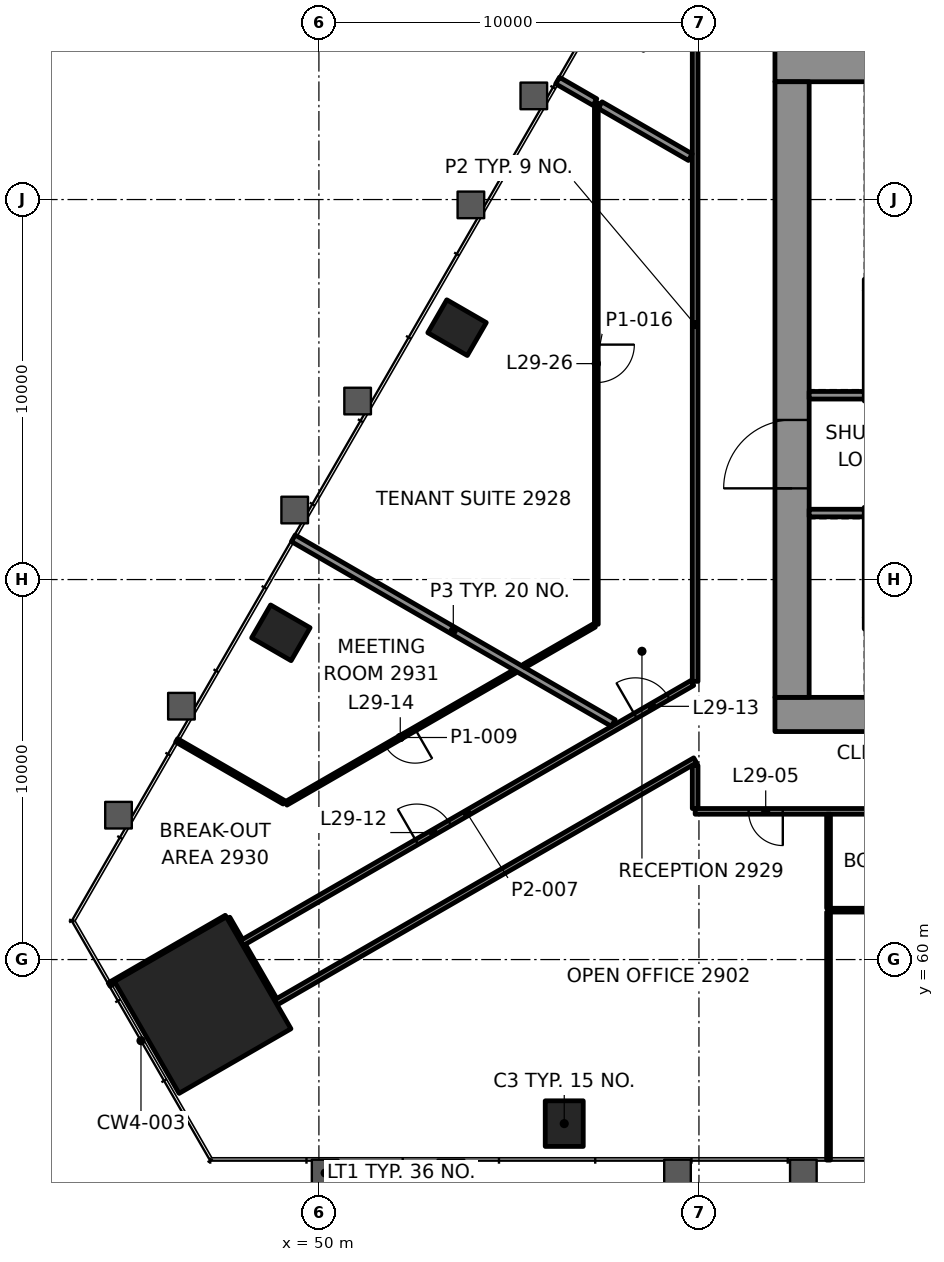
"""IFC4 building model, lengths in metres.
Left out: names, types, materials, properties, quantities, classifications, styles, units other than length and angle.
Written with IfcOpenShell. Run it as: python <this file> out.ifc"""

import sys

from ifc_helpers import new_model, si_unit, direction, frame, frame_2d, origin, origin_2d, place, context, subcontext, project, spatial, rectangle, extrude, element, fill, save


model = new_model("IFC4")
c1 = context("Model", 3, precision=1e-05, world=origin(), true_north=direction((0.0, 1.0)))
c2 = subcontext(c1, "Body", "Model", "MODEL_VIEW")
j1 = project(units=[si_unit("LENGTHUNIT", "METRE"), si_unit("PLANEANGLEUNIT", "RADIAN")], contexts=[c1])
p1 = place(None, origin())
s1 = spatial("IfcSite", under=j1, at=p1, CompositionType="ELEMENT")
p2 = place(p1, origin())
s2 = spatial("IfcBuilding", under=s1, at=p2, CompositionType="ELEMENT")
p3 = place(p2, frame((0.0, 0.0, 128.2)))
s3 = spatial("IfcBuildingStorey", under=s2, at=p3, CompositionType="ELEMENT", Elevation=128.2)
p4 = place(p3, frame((46.942, 58.801, 0.0), z_axis=(0.0, 0.0, 1.0), x_axis=(0.5, -0.866025403784, 0.0)))
e1 = element("IfcColumn", 1, at=p4, inside=s3, PredefinedType="COLUMN", context=c2, shape_type="SweptSolid", body=[
    extrude(rectangle(XDim=3.4, YDim=3.4, at=origin_2d()), origin(), (0.0, 0.0, 1.0), 4.2),
])
for number, where, z_axis, x_axis in (
    (2, (56.455, 55.683, -0.0), (0.0, 0.0, 1.0), (1.0, 0.0, 0.0)),
    (3, (53.635, 76.628, -0.0), (0.0, 0.0, 1.0), (-0.5, -0.866, 0.0)),
    (4, (48.999, 68.598, -0.0), (0.0, 0.0, 1.0), (-0.5, -0.866, 0.0)),
):
    element("IfcColumn", number, at=place(p3, frame(where, z_axis=z_axis, x_axis=x_axis)), inside=s3, PredefinedType="COLUMN", context=c2, shape_type="SweptSolid", body=[
        extrude(rectangle(XDim=1.0, YDim=1.2, at=origin_2d()), origin(), (0.0, 0.0, 1.0), 4.2),
    ])
p5 = place(p3, frame((62.0, 66.45, 0.0), z_axis=(0.0, 0.0, 1.0), x_axis=(1.0, 0.0, 0.0)))
e5 = element("IfcWall", 5, at=p5, inside=s3, PredefinedType="SHEAR", context=c2, shape_type="SweptSolid", body=[
    extrude(rectangle(XDim=26.0, YDim=0.9, at=frame_2d((13.0, 0.0))), origin(), (0.0, 0.0, 1.0), 4.0),
])
p6 = place(p5, frame((3.45, 0.0, 0.0)))
e6 = element("IfcOpeningElement", 6, at=p6, cuts=e5, PredefinedType="OPENING", context=c2, shape_type="SweptSolid", body=[
    extrude(rectangle(XDim=0.9, YDim=2.1, at=frame_2d((0.45, 1.05))), frame((0.0, 0.46, 0.0), z_axis=(0.0, -1.0, 0.0), x_axis=(1.0, 0.0, 0.0)), (0.0, 0.0, 1.0), 0.92),
])
p7 = place(p5, frame((6.425, 0.0, 0.0)))
e7 = element("IfcOpeningElement", 7, at=p7, cuts=e5, PredefinedType="OPENING", context=c2, shape_type="SweptSolid", body=[
    extrude(rectangle(XDim=0.9, YDim=2.1, at=frame_2d((0.45, 1.05))), frame((0.0, 0.46, 0.0), z_axis=(0.0, -1.0, 0.0), x_axis=(1.0, 0.0, 0.0)), (0.0, 0.0, 1.0), 0.92),
])
p8 = place(p5, frame((9.4, 0.0, 0.0)))
e8 = element("IfcOpeningElement", 8, at=p8, cuts=e5, PredefinedType="OPENING", context=c2, shape_type="SweptSolid", body=[
    extrude(rectangle(XDim=0.9, YDim=2.1, at=frame_2d((0.45, 1.05))), frame((0.0, 0.46, 0.0), z_axis=(0.0, -1.0, 0.0), x_axis=(1.0, 0.0, 0.0)), (0.0, 0.0, 1.0), 0.92),
])
p9 = place(p5, frame((14.262, 0.0, 0.0)))
e9 = element("IfcOpeningElement", 9, at=p9, cuts=e5, PredefinedType="OPENING", context=c2, shape_type="SweptSolid", body=[
    extrude(rectangle(XDim=0.9, YDim=2.1, at=frame_2d((0.45, 1.05))), frame((0.0, 0.46, 0.0), z_axis=(0.0, -1.0, 0.0), x_axis=(1.0, 0.0, 0.0)), (0.0, 0.0, 1.0), 0.92),
])
p10 = place(p5, frame((21.188, 0.0, 0.0)))
e10 = element("IfcOpeningElement", 10, at=p10, cuts=e5, PredefinedType="OPENING", context=c2, shape_type="SweptSolid", body=[
    extrude(rectangle(XDim=0.9, YDim=2.1, at=frame_2d((0.45, 1.05))), frame((0.0, 0.46, 0.0), z_axis=(0.0, -1.0, 0.0), x_axis=(1.0, 0.0, 0.0)), (0.0, 0.0, 1.0), 0.92),
])
p11 = place(p3, frame((62.0, 83.55, 0.0), z_axis=(0.0, 0.0, 1.0), x_axis=(1.0, 0.0, 0.0)))
e11 = element("IfcWall", 11, at=p11, inside=s3, PredefinedType="SHEAR", context=c2, shape_type="SweptSolid", body=[
    extrude(rectangle(XDim=26.0, YDim=0.9, at=frame_2d((13.0, 0.0))), origin(), (0.0, 0.0, 1.0), 4.0),
])
p12 = place(p11, frame((5.695, 0.0, 0.0)))
e12 = element("IfcOpeningElement", 12, at=p12, cuts=e11, PredefinedType="OPENING", context=c2, shape_type="SweptSolid", body=[
    extrude(rectangle(XDim=1.0, YDim=2.1, at=frame_2d((0.5, 1.05))), frame((0.0, 0.46, 0.0), z_axis=(0.0, -1.0, 0.0), x_axis=(1.0, 0.0, 0.0)), (0.0, 0.0, 1.0), 0.92),
])
p13 = place(p11, frame((19.505, 0.0, 0.0)))
e13 = element("IfcOpeningElement", 13, at=p13, cuts=e11, PredefinedType="OPENING", context=c2, shape_type="SweptSolid", body=[
    extrude(rectangle(XDim=1.0, YDim=2.1, at=frame_2d((0.5, 1.05))), frame((0.0, 0.46, 0.0), z_axis=(0.0, -1.0, 0.0), x_axis=(1.0, 0.0, 0.0)), (0.0, 0.0, 1.0), 0.92),
])
p14 = place(p11, frame((3.45, 0.0, 0.0)))
e14 = element("IfcOpeningElement", 14, at=p14, cuts=e11, PredefinedType="OPENING", context=c2, shape_type="SweptSolid", body=[
    extrude(rectangle(XDim=0.9, YDim=2.1, at=frame_2d((0.45, 1.05))), frame((0.0, 0.46, 0.0), z_axis=(0.0, -1.0, 0.0), x_axis=(1.0, 0.0, 0.0)), (0.0, 0.0, 1.0), 0.92),
])
p15 = place(p11, frame((12.65, 0.0, 0.0)))
e15 = element("IfcOpeningElement", 15, at=p15, cuts=e11, PredefinedType="OPENING", context=c2, shape_type="SweptSolid", body=[
    extrude(rectangle(XDim=0.9, YDim=2.1, at=frame_2d((0.45, 1.05))), frame((0.0, 0.46, 0.0), z_axis=(0.0, -1.0, 0.0), x_axis=(1.0, 0.0, 0.0)), (0.0, 0.0, 1.0), 0.92),
])
p16 = place(p11, frame((22.55, 0.0, 0.0)))
e16 = element("IfcOpeningElement", 16, at=p16, cuts=e11, PredefinedType="OPENING", context=c2, shape_type="SweptSolid", body=[
    extrude(rectangle(XDim=0.9, YDim=2.1, at=frame_2d((0.45, 1.05))), frame((0.0, 0.46, 0.0), z_axis=(0.0, -1.0, 0.0), x_axis=(1.0, 0.0, 0.0)), (0.0, 0.0, 1.0), 0.92),
])
p17 = place(p3, frame((62.45, 66.9, 0.0), z_axis=(0.0, 0.0, 1.0), x_axis=(0.0, 1.0, 0.0)))
e17 = element("IfcWall", 17, at=p17, inside=s3, PredefinedType="SHEAR", context=c2, shape_type="SweptSolid", body=[
    extrude(rectangle(XDim=16.2, YDim=0.9, at=frame_2d((8.1, 0.0))), origin(), (0.0, 0.0, 1.0), 4.0),
])
p18 = place(p17, frame((5.5, 0.0, 0.0)))
e18 = element("IfcOpeningElement", 18, at=p18, cuts=e17, PredefinedType="OPENING", context=c2, shape_type="SweptSolid", body=[
    extrude(rectangle(XDim=1.8, YDim=2.1, at=frame_2d((0.9, 1.05))), frame((0.0, 0.46, 0.0), z_axis=(0.0, -1.0, 0.0), x_axis=(1.0, 0.0, 0.0)), (0.0, 0.0, 1.0), 0.92),
])
for number, where, z_axis, x_axis in (
    (19, (64.35, 68.85, 0.0), (0.0, 0.0, 1.0), (1.0, 0.0, 0.0)),
    (20, (64.35, 71.75, 0.0), (0.0, 0.0, 1.0), (1.0, 0.0, 0.0)),
    (21, (64.35, 74.85, 0.0), (0.0, 0.0, 1.0), (1.0, 0.0, 0.0)),
):
    element("IfcWall", number, at=place(p3, frame(where, z_axis=z_axis, x_axis=x_axis)), inside=s3, PredefinedType="SHEAR", context=c2, shape_type="SweptSolid", body=[
        extrude(rectangle(XDim=3.1, YDim=0.3, at=frame_2d((1.55, 0.0))), origin(), (0.0, 0.0, 1.0), 4.0),
    ])
for number, where, z_axis, x_axis in (
    (22, (64.5, 69.0, 0.0), (0.0, 0.0, 1.0), (0.0, 1.0, 0.0)),
    (23, (64.5, 75.0, 0.0), (0.0, 0.0, 1.0), (0.0, 1.0, 0.0)),
):
    element("IfcWall", number, at=place(p3, frame(where, z_axis=z_axis, x_axis=x_axis)), inside=s3, PredefinedType="SHEAR", context=c2, shape_type="SweptSolid", body=[
        extrude(rectangle(XDim=2.6, YDim=0.3, at=frame_2d((1.3, 0.0))), origin(), (0.0, 0.0, 1.0), 4.0),
    ])
p19 = place(p3, frame((64.35, 77.75, 0.0), z_axis=(0.0, 0.0, 1.0), x_axis=(1.0, 0.0, 0.0)))
e24 = element("IfcWall", 24, at=p19, inside=s3, PredefinedType="SHEAR", context=c2, shape_type="SweptSolid", body=[
    extrude(rectangle(XDim=22.75, YDim=0.3, at=frame_2d((11.375, 0.0))), origin(), (0.0, 0.0, 1.0), 4.0),
])
p20 = place(p19, frame((3.345, 0.0, 0.0)))
e25 = element("IfcOpeningElement", 25, at=p20, cuts=e24, PredefinedType="OPENING", context=c2, shape_type="SweptSolid", body=[
    extrude(rectangle(XDim=1.0, YDim=2.1, at=frame_2d((0.5, 1.05))), frame((0.0, 0.16, 0.0), z_axis=(0.0, -1.0, 0.0), x_axis=(1.0, 0.0, 0.0)), (0.0, 0.0, 1.0), 0.32),
])
p21 = place(p3, frame((63.41, 61.3, 0.0), z_axis=(0.0, 0.0, 1.0), x_axis=(1.0, 0.0, 0.0)))
e26 = element("IfcWall", 26, at=p21, inside=s3, PredefinedType="PARTITIONING", context=c2, shape_type="SweptSolid", body=[
    extrude(rectangle(XDim=28.319, YDim=0.1, at=frame_2d((14.16, 0.0))), origin(), (0.0, 0.0, 1.0), 3.4),
])
p22 = place(p21, frame((7.613, 0.0, 0.0)))
e27 = element("IfcOpeningElement", 27, at=p22, cuts=e26, PredefinedType="OPENING", context=c2, shape_type="SweptSolid", body=[
    extrude(rectangle(XDim=1.2, YDim=2.1, at=frame_2d((0.6, 1.05))), frame((0.0, 0.06, 0.0), z_axis=(0.0, -1.0, 0.0), x_axis=(1.0, 0.0, 0.0)), (0.0, 0.0, 1.0), 0.12),
])
p23 = place(p21, frame((21.573, 0.0, 0.0)))
e28 = element("IfcOpeningElement", 28, at=p23, cuts=e26, PredefinedType="OPENING", context=c2, shape_type="SweptSolid", body=[
    extrude(rectangle(XDim=1.2, YDim=2.1, at=frame_2d((0.6, 1.05))), frame((0.0, 0.06, 0.0), z_axis=(0.0, -1.0, 0.0), x_axis=(1.0, 0.0, 0.0)), (0.0, 0.0, 1.0), 0.12),
])
p24 = place(p3, frame((90.1, 63.9, 0.0), z_axis=(0.0, 0.0, 1.0), x_axis=(-1.0, 0.0, 0.0)))
e29 = element("IfcWall", 29, at=p24, inside=s3, PredefinedType="PARTITIONING", context=c2, shape_type="SweptSolid", body=[
    extrude(rectangle(XDim=30.2, YDim=0.15, at=frame_2d((15.1, 0.0))), origin(), (0.0, 0.0, 1.0), 3.4),
])
p25 = place(p24, frame((4.833, 0.0, 0.0)))
e30 = element("IfcOpeningElement", 30, at=p25, cuts=e29, PredefinedType="OPENING", context=c2, shape_type="SweptSolid", body=[
    extrude(rectangle(XDim=1.0, YDim=2.1, at=frame_2d((0.5, 1.05))), frame((0.0, 0.085, 0.0), z_axis=(0.0, -1.0, 0.0), x_axis=(1.0, 0.0, 0.0)), (0.0, 0.0, 1.0), 0.17),
])
p26 = place(p24, frame((18.077, 0.0, 0.0)))
e31 = element("IfcOpeningElement", 31, at=p26, cuts=e29, PredefinedType="OPENING", context=c2, shape_type="SweptSolid", body=[
    extrude(rectangle(XDim=1.0, YDim=2.1, at=frame_2d((0.5, 1.05))), frame((0.0, 0.085, 0.0), z_axis=(0.0, -1.0, 0.0), x_axis=(1.0, 0.0, 0.0)), (0.0, 0.0, 1.0), 0.17),
])
p27 = place(p24, frame((27.893, 0.0, 0.0)))
e32 = element("IfcOpeningElement", 32, at=p27, cuts=e29, PredefinedType="OPENING", context=c2, shape_type="SweptSolid", body=[
    extrude(rectangle(XDim=0.9, YDim=2.1, at=frame_2d((0.45, 1.05))), frame((0.0, 0.085, 0.0), z_axis=(0.0, -1.0, 0.0), x_axis=(1.0, 0.0, 0.0)), (0.0, 0.0, 1.0), 0.17),
])
p28 = place(p3, frame((48.865, 58.872, 0.0), z_axis=(0.0, 0.0, 1.0), x_axis=(0.866019033468, 0.500011033549, 0.0)))
e33 = element("IfcWall", 33, at=p28, inside=s3, PredefinedType="PARTITIONING", context=c2, shape_type="SweptSolid", body=[
    extrude(rectangle(XDim=12.742, YDim=0.15, at=frame_2d((6.371, 0.0))), origin(), (0.0, 0.0, 1.0), 3.247),
])
p29 = place(p3, frame((47.967, 60.432, 0.0), z_axis=(0.0, 0.0, 1.0), x_axis=(0.866021388453, 0.500006954693, 0.0)))
e34 = element("IfcWall", 34, at=p29, inside=s3, PredefinedType="PARTITIONING", context=c2, shape_type="SweptSolid", body=[
    extrude(rectangle(XDim=13.693, YDim=0.15, at=frame_2d((6.846, 0.0))), origin(), (0.0, 0.0, 1.0), 3.4),
])
p30 = place(p29, frame((5.321, 0.0, 0.0)))
e35 = element("IfcOpeningElement", 35, at=p30, cuts=e34, PredefinedType="OPENING", context=c2, shape_type="SweptSolid", body=[
    extrude(rectangle(XDim=1.0, YDim=2.1, at=frame_2d((0.5, 1.05))), frame((0.0, 0.085, 0.0), z_axis=(0.0, -1.0, 0.0), x_axis=(1.0, 0.0, 0.0)), (0.0, 0.0, 1.0), 0.17),
])
p31 = place(p29, frame((11.964, 0.0, 0.0)))
e36 = element("IfcOpeningElement", 36, at=p31, cuts=e34, PredefinedType="OPENING", context=c2, shape_type="SweptSolid", body=[
    extrude(rectangle(XDim=1.0, YDim=2.1, at=frame_2d((0.5, 1.05))), frame((0.0, 0.085, 0.0), z_axis=(0.0, -1.0, 0.0), x_axis=(1.0, 0.0, 0.0)), (0.0, 0.0, 1.0), 0.17),
])
p32 = place(p3, frame((44.481, 59.343, 0.0), z_axis=(0.0, 0.0, 1.0), x_axis=(0.866008413041, 0.500029427677, 0.0)))
e37 = element("IfcWall", 37, at=p32, inside=s3, PredefinedType="PARTITIONING", context=c2, shape_type="SweptSolid", body=[
    extrude(rectangle(XDim=3.557, YDim=0.1, at=frame_2d((1.778, 0.0))), origin(), (0.0, 0.0, 1.0), 3.4),
])
p33 = place(p3, frame((55.148, 67.58, 0.0), z_axis=(0.0, 0.0, 1.0), x_axis=(-0.866019333862, -0.500010513267, 0.0)))
e38 = element("IfcWall", 38, at=p33, inside=s3, PredefinedType="PARTITIONING", context=c2, shape_type="SweptSolid", body=[
    extrude(rectangle(XDim=6.945, YDim=0.1, at=frame_2d((3.473, 0.0))), origin(), (0.0, 0.0, 1.0), 3.4),
])
p34 = place(p33, frame((3.023, 0.0, 0.0)))
e39 = element("IfcOpeningElement", 39, at=p34, cuts=e38, PredefinedType="OPENING", context=c2, shape_type="SweptSolid", body=[
    extrude(rectangle(XDim=0.9, YDim=2.1, at=frame_2d((0.45, 1.05))), frame((0.0, 0.06, 0.0), z_axis=(0.0, -1.0, 0.0), x_axis=(1.0, 0.0, 0.0)), (0.0, 0.0, 1.0), 0.12),
])
p35 = place(p3, frame((63.41, 54.723, 0.0), z_axis=(0.0, 0.0, 1.0), x_axis=(0.0, 1.0, 0.0)))
e40 = element("IfcWall", 40, at=p35, inside=s3, PredefinedType="PARTITIONING", context=c2, shape_type="SweptSolid", body=[
    extrude(rectangle(XDim=6.527, YDim=0.1, at=frame_2d((3.264, 0.0))), origin(), (0.0, 0.0, 1.0), 3.165),
])
p36 = place(p3, frame((59.9, 63.976, 0.0), z_axis=(0.0, 0.0, 1.0), x_axis=(0.0, 1.0, 0.0)))
e41 = element("IfcWall", 41, at=p36, inside=s3, PredefinedType="PARTITIONING", context=c2, shape_type="SweptSolid", body=[
    extrude(rectangle(XDim=1.131, YDim=0.15, at=frame_2d((0.565, 0.0))), origin(), (0.0, 0.0, 1.0), 3.247),
])
p37 = place(p3, frame((59.9, 67.321, 0.0), z_axis=(0.0, 0.0, 1.0), x_axis=(0.0, 1.0, 0.0)))
e42 = element("IfcWall", 42, at=p37, inside=s3, PredefinedType="PARTITIONING", context=c2, shape_type="SweptSolid", body=[
    extrude(rectangle(XDim=18.778, YDim=0.15, at=frame_2d((9.389, 0.0))), origin(), (0.0, 0.0, 1.0), 3.4),
])
p38 = place(p3, frame((57.3, 82.542, 0.0), z_axis=(0.0, 0.0, 1.0), x_axis=(0.0, -1.0, 0.0)))
e43 = element("IfcWall", 43, at=p38, inside=s3, PredefinedType="PARTITIONING", context=c2, shape_type="SweptSolid", body=[
    extrude(rectangle(XDim=13.72, YDim=0.1, at=frame_2d((6.86, 0.0))), origin(), (0.0, 0.0, 1.0), 3.4),
])
p39 = place(p38, frame((6.36, 0.0, 0.0)))
e44 = element("IfcOpeningElement", 44, at=p39, cuts=e43, PredefinedType="OPENING", context=c2, shape_type="SweptSolid", body=[
    extrude(rectangle(XDim=1.0, YDim=2.1, at=frame_2d((0.5, 1.05))), frame((0.0, 0.06, 0.0), z_axis=(0.0, -1.0, 0.0), x_axis=(1.0, 0.0, 0.0)), (0.0, 0.0, 1.0), 0.12),
])
p40 = place(p3, frame((48.826, 58.937, 0.0), z_axis=(0.0, 0.0, 1.0), x_axis=(-0.499991515992, 0.866030301974, 0.0)))
e45 = element("IfcWall", 45, at=p40, inside=s3, PredefinedType="PARTITIONING", context=c2, shape_type="SweptSolid", body=[
    extrude(rectangle(XDim=1.649, YDim=0.15, at=frame_2d((0.825, 0.0))), origin(), (0.0, 0.0, 1.0), 3.247),
])
p41 = place(p3, frame((59.773, 81.115, 0.0), z_axis=(0.0, 0.0, 1.0), x_axis=(-0.86604168154, 0.499971805041, 0.0)))
e46 = element("IfcWall", 46, at=p41, inside=s3, PredefinedType="PARTITIONING", context=c2, shape_type="SweptSolid", body=[
    extrude(rectangle(XDim=2.74, YDim=0.2, at=frame_2d((1.37, 0.0))), origin(), (0.0, 0.0, 1.0), 3.4),
])
p42 = place(p3, frame((57.746, 66.224, 0.0), z_axis=(0.0, 0.0, 1.0), x_axis=(-0.866017068849, 0.500014436255, 0.0)))
e47 = element("IfcWall", 47, at=p42, inside=s3, PredefinedType="PARTITIONING", context=c2, shape_type="SweptSolid", body=[
    extrude(rectangle(XDim=9.723, YDim=0.2, at=frame_2d((4.861, 0.0))), origin(), (0.0, 0.0, 1.0), 3.165),
])
p43 = place(p3, frame((49.083, 64.136, 0.0), z_axis=(0.0, 0.0, 1.0), x_axis=(-0.866048593798, 0.499959831567, 0.0)))
e48 = element("IfcWall", 48, at=p43, inside=s3, PredefinedType="PARTITIONING", context=c2, shape_type="SweptSolid", body=[
    extrude(rectangle(XDim=3.264, YDim=0.1, at=frame_2d((1.632, 0.0))), origin(), (0.0, 0.0, 1.0), 3.4),
])
p44 = place(p3, frame((47.927, 60.495, 0.0), z_axis=(0.0, 0.0, 1.0), x_axis=(-0.5000475079, 0.865997973348, 0.0)))
e49 = element("IfcWall", 49, at=p44, inside=s3, PredefinedType="PARTITIONING", context=c2, shape_type="SweptSolid", body=[
    extrude(rectangle(XDim=0.672, YDim=0.15, at=frame_2d((0.336, 0.0))), origin(), (0.0, 0.0, 1.0), 3.4),
])
p45 = place(p3, frame((55.398, 67.724, 0.0), z_axis=(0.0, 0.0, 1.0), x_axis=(0.866063918387, 0.499933284817, 0.0)))
e50 = element("IfcWall", 50, at=p45, inside=s3, PredefinedType="PARTITIONING", context=c2, shape_type="SweptSolid", body=[
    extrude(rectangle(XDim=2.138, YDim=0.1, at=frame_2d((1.069, 0.0))), origin(), (0.0, 0.0, 1.0), 3.4),
])
p46 = place(p3, frame((57.263, 82.564, 0.0), z_axis=(0.0, 0.0, 1.0), x_axis=(-0.8660349869, 0.499983401189, 0.0)))
e51 = element("IfcWall", 51, at=p46, inside=s3, PredefinedType="PARTITIONING", context=c2, shape_type="SweptSolid", body=[
    extrude(rectangle(XDim=1.134, YDim=0.2, at=frame_2d((0.567, 0.0))), origin(), (0.0, 0.0, 1.0), 3.165),
])
p47 = place(p3, frame((63.41, 61.35, 0.0), z_axis=(0.0, 0.0, 1.0), x_axis=(0.0, 1.0, 0.0)))
e52 = element("IfcWall", 52, at=p47, inside=s3, PredefinedType="PARTITIONING", context=c2, shape_type="SweptSolid", body=[
    extrude(rectangle(XDim=2.475, YDim=0.1, at=frame_2d((1.237, 0.0))), origin(), (0.0, 0.0, 1.0), 3.4),
])
for number, where, z_axis, x_axis in (
    (53, (62.9, 71.75, 0.0), (0.0, 0.0, 1.0), (1.0, 0.0, 0.0)),
    (54, (62.9, 74.85, 0.0), (0.0, 0.0, 1.0), (1.0, 0.0, 0.0)),
):
    element("IfcWall", number, at=place(p3, frame(where, z_axis=z_axis, x_axis=x_axis)), inside=s3, PredefinedType="PARTITIONING", context=c2, shape_type="SweptSolid", body=[
        extrude(rectangle(XDim=1.45, YDim=0.2, at=frame_2d((0.725, 0.0))), origin(), (0.0, 0.0, 1.0), 4.0),
    ])
p48 = place(p27, origin())
e55 = element("IfcDoor", 55, at=p48, inside=s3, OperationType="SINGLE_SWING_RIGHT", PredefinedType="DOOR", context=c2, shape_type="SweptSolid", body=[
    extrude(rectangle(XDim=0.9, YDim=2.1, at=frame_2d((0.45, 1.05))), frame((0.0, 0.025, 0.0), z_axis=(0.0, -1.0, 0.0), x_axis=(1.0, 0.0, 0.0)), (0.0, 0.0, 1.0), 0.05),
])
fill(e32, e55)
p49 = place(p30, origin())
e56 = element("IfcDoor", 56, at=p49, inside=s3, OperationType="SINGLE_SWING_LEFT", PredefinedType="DOOR", context=c2, shape_type="SweptSolid", body=[
    extrude(rectangle(XDim=1.0, YDim=2.1, at=frame_2d((0.5, 1.05))), frame((0.0, 0.025, 0.0), z_axis=(0.0, -1.0, 0.0), x_axis=(1.0, 0.0, 0.0)), (0.0, 0.0, 1.0), 0.05),
])
fill(e35, e56)
p50 = place(p31, origin())
e57 = element("IfcDoor", 57, at=p50, inside=s3, OperationType="SINGLE_SWING_RIGHT", PredefinedType="DOOR", context=c2, shape_type="SweptSolid", body=[
    extrude(rectangle(XDim=1.0, YDim=2.1, at=frame_2d((0.5, 1.05))), frame((0.0, 0.025, 0.0), z_axis=(0.0, -1.0, 0.0), x_axis=(1.0, 0.0, 0.0)), (0.0, 0.0, 1.0), 0.05),
])
fill(e36, e57)
p51 = place(p34, origin())
e58 = element("IfcDoor", 58, at=p51, inside=s3, OperationType="SINGLE_SWING_LEFT", PredefinedType="DOOR", context=c2, shape_type="SweptSolid", body=[
    extrude(rectangle(XDim=0.9, YDim=2.1, at=frame_2d((0.45, 1.05))), frame((0.0, 0.025, 0.0), z_axis=(0.0, -1.0, 0.0), x_axis=(1.0, 0.0, 0.0)), (0.0, 0.0, 1.0), 0.05),
])
fill(e39, e58)
p52 = place(p39, origin())
e59 = element("IfcDoor", 59, at=p52, inside=s3, OperationType="SINGLE_SWING_RIGHT", PredefinedType="DOOR", context=c2, shape_type="SweptSolid", body=[
    extrude(rectangle(XDim=1.0, YDim=2.1, at=frame_2d((0.5, 1.05))), frame((0.0, 0.025, 0.0), z_axis=(0.0, -1.0, 0.0), x_axis=(1.0, 0.0, 0.0)), (0.0, 0.0, 1.0), 0.05),
])
fill(e44, e59)
p53 = place(p18, origin())
e60 = element("IfcDoor", 60, at=p53, inside=s3, OperationType="SINGLE_SWING_LEFT", PredefinedType="DOOR", context=c2, shape_type="SweptSolid", body=[
    extrude(rectangle(XDim=1.8, YDim=2.1, at=frame_2d((0.9, 1.05))), frame((0.0, 0.17, 0.0), z_axis=(0.0, -1.0, 0.0), x_axis=(1.0, 0.0, 0.0)), (0.0, 0.0, 1.0), 0.34),
])
fill(e18, e60)
save(model, sys.argv[1])
